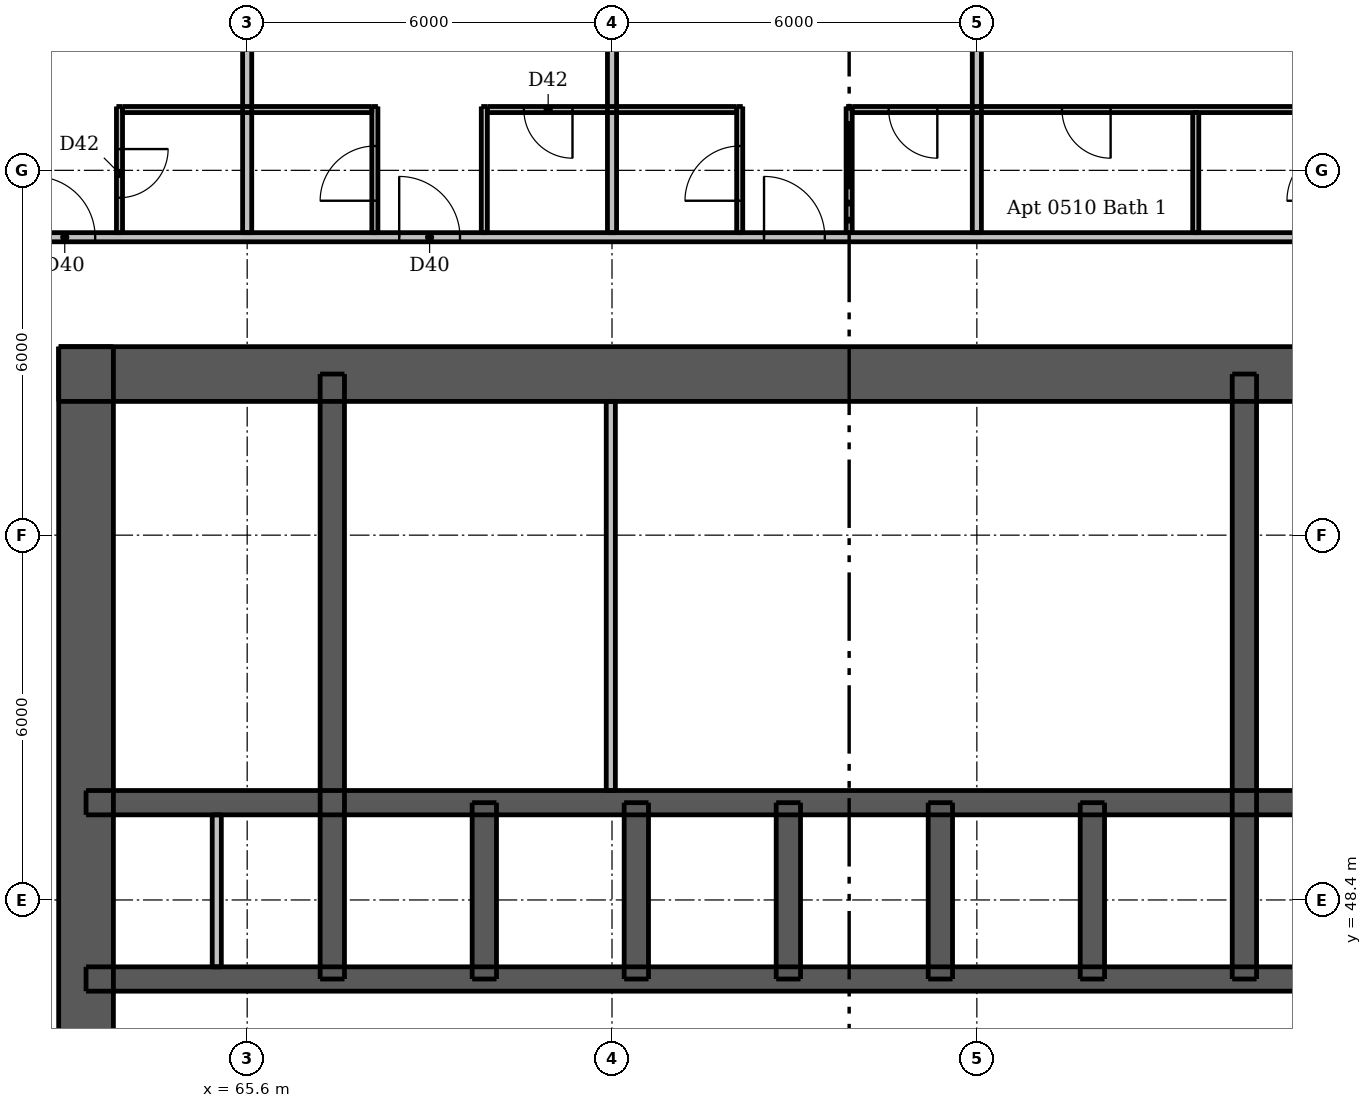
"""IFC4 building model, lengths in metres.
Left out: names, types, materials, properties, quantities, classifications, styles, units other than length and angle.
Written with IfcOpenShell. Run it as: python <this file> out.ifc"""

import sys

from ifc_helpers import new_model, si_unit, direction, frame, frame_2d, origin, place, context, subcontext, project, spatial, rectangle, extrude, element, fill, save


model = new_model("IFC4")
c1 = context("Model", 3, precision=1e-05, world=origin(), true_north=direction((0.0, 1.0)))
c2 = subcontext(c1, "Body", "Model", "MODEL_VIEW")
j1 = project(units=[si_unit("LENGTHUNIT", "METRE"), si_unit("PLANEANGLEUNIT", "RADIAN")], contexts=[c1])
p1 = place(None, origin())
s1 = spatial("IfcSite", under=j1, at=p1, CompositionType="ELEMENT")
p2 = place(p1, origin())
s2 = spatial("IfcBuilding", under=s1, at=p2, CompositionType="ELEMENT")
p3 = place(p2, frame((0.0, 0.0, 23.5)))
s3 = spatial("IfcBuildingStorey", under=s2, at=p3, CompositionType="ELEMENT", Elevation=23.5)
p4 = place(p3, frame((62.5, 57.05, 0.0), z_axis=(0.0, 0.0, 1.0), x_axis=(1.0, 0.0, 0.0)))
e1 = element("IfcWall", 1, at=p4, inside=s3, PredefinedType="SHEAR", context=c2, shape_type="SweptSolid", body=[
    extrude(rectangle(XDim=24.0, YDim=0.9, at=frame_2d((12.0, 0.0))), origin(), (0.0, 0.0, 1.0), 3.05),
])
p5 = place(p4, frame((20.85, 0.0, 0.0)))
e2 = element("IfcOpeningElement", 2, at=p5, cuts=e1, PredefinedType="OPENING", context=c2, shape_type="SweptSolid", body=[
    extrude(rectangle(XDim=1.1, YDim=2.1, at=frame_2d((0.55, 1.05))), frame((0.0, 0.46, 0.0), z_axis=(0.0, -1.0, 0.0), x_axis=(1.0, 0.0, 0.0)), (0.0, 0.0, 1.0), 0.92),
])
p6 = place(p4, frame((2.05, 0.0, 0.0)))
e3 = element("IfcOpeningElement", 3, at=p6, cuts=e1, PredefinedType="OPENING", context=c2, shape_type="SweptSolid", body=[
    extrude(rectangle(XDim=1.1, YDim=2.1, at=frame_2d((0.55, 1.05))), frame((0.0, 0.46, 0.0), z_axis=(0.0, -1.0, 0.0), x_axis=(1.0, 0.0, 0.0)), (0.0, 0.0, 1.0), 0.92),
])
p7 = place(p4, frame((6.44, 0.0, 0.0)))
e4 = element("IfcOpeningElement", 4, at=p7, cuts=e1, PredefinedType="OPENING", context=c2, shape_type="SweptSolid", body=[
    extrude(rectangle(XDim=0.9, YDim=2.1, at=frame_2d((0.45, 1.05))), frame((0.0, 0.46, 0.0), z_axis=(0.0, -1.0, 0.0), x_axis=(1.0, 0.0, 0.0)), (0.0, 0.0, 1.0), 0.92),
])
p8 = place(p4, frame((13.74, 0.0, 0.0)))
e5 = element("IfcOpeningElement", 5, at=p8, cuts=e1, PredefinedType="OPENING", context=c2, shape_type="SweptSolid", body=[
    extrude(rectangle(XDim=0.9, YDim=2.1, at=frame_2d((0.45, 1.05))), frame((0.0, 0.46, 0.0), z_axis=(0.0, -1.0, 0.0), x_axis=(1.0, 0.0, 0.0)), (0.0, 0.0, 1.0), 0.92),
])
p9 = place(p3, frame((62.95, 33.5, 0.0), z_axis=(0.0, 0.0, 1.0), x_axis=(0.0, 1.0, 0.0)))
e6 = element("IfcWall", 6, at=p9, inside=s3, PredefinedType="SHEAR", context=c2, shape_type="SweptSolid", body=[
    extrude(rectangle(XDim=24.0, YDim=0.9, at=frame_2d((12.0, 0.0))), origin(), (0.0, 0.0, 1.0), 3.05),
])
p10 = place(p9, frame((11.2, 0.0, 0.0)))
e7 = element("IfcOpeningElement", 7, at=p10, cuts=e6, PredefinedType="OPENING", context=c2, shape_type="SweptSolid", body=[
    extrude(rectangle(XDim=1.6, YDim=2.1, at=frame_2d((0.8, 1.05))), frame((0.0, 0.46, 0.0), z_axis=(0.0, -1.0, 0.0), x_axis=(1.0, 0.0, 0.0)), (0.0, 0.0, 1.0), 0.92),
])
p11 = place(p3, frame((62.95, 47.1, 0.0), z_axis=(0.0, 0.0, 1.0), x_axis=(1.0, 0.0, 0.0)))
e8 = element("IfcWall", 8, at=p11, inside=s3, PredefinedType="SHEAR", context=c2, shape_type="SweptSolid", body=[
    extrude(rectangle(XDim=23.1, YDim=0.4, at=frame_2d((11.55, 0.0))), origin(), (0.0, 0.0, 1.0), 3.05),
])
p12 = place(p11, frame((0.85, 0.0, 0.0)))
e9 = element("IfcOpeningElement", 9, at=p12, cuts=e8, PredefinedType="OPENING", context=c2, shape_type="SweptSolid", body=[
    extrude(rectangle(XDim=0.9, YDim=2.1, at=frame_2d((0.45, 1.05))), frame((0.0, 0.21, 0.0), z_axis=(0.0, -1.0, 0.0), x_axis=(1.0, 0.0, 0.0)), (0.0, 0.0, 1.0), 0.42),
])
p13 = place(p11, frame((2.55, 0.0, 0.0)))
e10 = element("IfcOpeningElement", 10, at=p13, cuts=e8, PredefinedType="OPENING", context=c2, shape_type="SweptSolid", body=[
    extrude(rectangle(XDim=0.9, YDim=2.1, at=frame_2d((0.45, 1.05))), frame((0.0, 0.21, 0.0), z_axis=(0.0, -1.0, 0.0), x_axis=(1.0, 0.0, 0.0)), (0.0, 0.0, 1.0), 0.42),
])
p14 = place(p11, frame((20.5, 0.0, 0.0)))
e11 = element("IfcOpeningElement", 11, at=p14, cuts=e8, PredefinedType="OPENING", context=c2, shape_type="SweptSolid", body=[
    extrude(rectangle(XDim=0.9, YDim=2.1, at=frame_2d((0.45, 1.05))), frame((0.0, 0.21, 0.0), z_axis=(0.0, -1.0, 0.0), x_axis=(1.0, 0.0, 0.0)), (0.0, 0.0, 1.0), 0.42),
])
p15 = place(p3, frame((62.95, 50.0, 0.0), z_axis=(0.0, 0.0, 1.0), x_axis=(1.0, 0.0, 0.0)))
e12 = element("IfcWall", 12, at=p15, inside=s3, PredefinedType="SHEAR", context=c2, shape_type="SweptSolid", body=[
    extrude(rectangle(XDim=23.1, YDim=0.4, at=frame_2d((11.55, 0.0))), origin(), (0.0, 0.0, 1.0), 3.05),
])
for number, where, z_axis, x_axis in (
    (13, (67.0, 47.1, 0.0), (0.0, 0.0, 1.0), (0.0, 1.0, 0.0)),
    (14, (82.0, 47.1, 0.0), (0.0, 0.0, 1.0), (0.0, 1.0, 0.0)),
):
    element("IfcWall", number, at=place(p3, frame(where, z_axis=z_axis, x_axis=x_axis)), inside=s3, PredefinedType="SHEAR", context=c2, shape_type="SweptSolid", body=[
        extrude(rectangle(XDim=9.95, YDim=0.4, at=frame_2d((4.975, 0.0))), origin(), (0.0, 0.0, 1.0), 3.05),
    ])
for number, where, z_axis, x_axis in (
    (15, (69.5, 47.1, 0.0), (0.0, 0.0, 1.0), (0.0, 1.0, 0.0)),
    (16, (72.0, 47.1, 0.0), (0.0, 0.0, 1.0), (0.0, 1.0, 0.0)),
    (17, (74.5, 47.1, 0.0), (0.0, 0.0, 1.0), (0.0, 1.0, 0.0)),
    (18, (77.0, 47.1, 0.0), (0.0, 0.0, 1.0), (0.0, 1.0, 0.0)),
    (19, (79.5, 47.1, 0.0), (0.0, 0.0, 1.0), (0.0, 1.0, 0.0)),
):
    element("IfcWall", number, at=place(p3, frame(where, z_axis=z_axis, x_axis=x_axis)), inside=s3, PredefinedType="SHEAR", context=c2, shape_type="SweptSolid", body=[
        extrude(rectangle(XDim=2.9, YDim=0.4, at=frame_2d((1.45, 0.0))), origin(), (0.0, 0.0, 1.0), 3.05),
    ])
p16 = place(p3, frame((65.1, 47.3, 0.0), z_axis=(0.0, 0.0, 1.0), x_axis=(0.0, 1.0, 0.0)))
e20 = element("IfcWall", 20, at=p16, inside=s3, PredefinedType="PLUMBINGWALL", context=c2, shape_type="SweptSolid", body=[
    extrude(rectangle(XDim=2.5, YDim=0.15, at=frame_2d((1.25, 0.0))), origin(), (0.0, 0.0, 1.0), 3.05),
])
p17 = place(p3, frame((71.58, 50.2, 0.0), z_axis=(0.0, 0.0, 1.0), x_axis=(0.0, 1.0, 0.0)))
e21 = element("IfcWall", 21, at=p17, inside=s3, PredefinedType="PLUMBINGWALL", context=c2, shape_type="SweptSolid", body=[
    extrude(rectangle(XDim=6.4, YDim=0.15, at=frame_2d((3.2, 0.0))), origin(), (0.0, 0.0, 1.0), 3.05),
])
p18 = place(p3, frame((63.5, 61.45, 0.0), z_axis=(0.0, 0.0, 1.0), x_axis=(0.0, -1.0, 0.0)))
e22 = element("IfcWall", 22, at=p18, inside=s3, PredefinedType="PARTITIONING", context=c2, shape_type="SweptSolid", body=[
    extrude(rectangle(XDim=2.075, YDim=0.1, at=frame_2d((1.038, 0.0))), origin(), (0.0, 0.0, 1.0), 3.05),
])
p19 = place(p18, frame((0.7, 0.0, 0.0)))
e23 = element("IfcOpeningElement", 23, at=p19, cuts=e22, PredefinedType="OPENING", context=c2, shape_type="SweptSolid", body=[
    extrude(rectangle(XDim=0.8, YDim=2.1, at=frame_2d((0.4, 1.05))), frame((0.0, 0.06, 0.0), z_axis=(0.0, -1.0, 0.0), x_axis=(1.0, 0.0, 0.0)), (0.0, 0.0, 1.0), 0.12),
])
p20 = place(p3, frame((67.7, 59.375, 0.0), z_axis=(0.0, 0.0, 1.0), x_axis=(0.0, 1.0, 0.0)))
e24 = element("IfcWall", 24, at=p20, inside=s3, PredefinedType="PARTITIONING", context=c2, shape_type="SweptSolid", body=[
    extrude(rectangle(XDim=2.075, YDim=0.1, at=frame_2d((1.038, 0.0))), origin(), (0.0, 0.0, 1.0), 3.05),
])
p21 = place(p20, frame((0.525, 0.0, 0.0)))
e25 = element("IfcOpeningElement", 25, at=p21, cuts=e24, PredefinedType="OPENING", context=c2, shape_type="SweptSolid", body=[
    extrude(rectangle(XDim=0.9, YDim=2.1, at=frame_2d((0.45, 1.05))), frame((0.0, 0.06, 0.0), z_axis=(0.0, -1.0, 0.0), x_axis=(1.0, 0.0, 0.0)), (0.0, 0.0, 1.0), 0.12),
])
p22 = place(p3, frame((69.5, 59.375, 0.0), z_axis=(0.0, 0.0, 1.0), x_axis=(0.0, 1.0, 0.0)))
e26 = element("IfcWall", 26, at=p22, inside=s3, PredefinedType="PARTITIONING", context=c2, shape_type="SweptSolid", body=[
    extrude(rectangle(XDim=2.075, YDim=0.1, at=frame_2d((1.038, 0.0))), origin(), (0.0, 0.0, 1.0), 3.05),
])
p23 = place(p3, frame((73.7, 59.375, 0.0), z_axis=(0.0, 0.0, 1.0), x_axis=(0.0, 1.0, 0.0)))
e27 = element("IfcWall", 27, at=p23, inside=s3, PredefinedType="PARTITIONING", context=c2, shape_type="SweptSolid", body=[
    extrude(rectangle(XDim=2.075, YDim=0.1, at=frame_2d((1.038, 0.0))), origin(), (0.0, 0.0, 1.0), 3.05),
])
p24 = place(p23, frame((0.525, 0.0, 0.0)))
e28 = element("IfcOpeningElement", 28, at=p24, cuts=e27, PredefinedType="OPENING", context=c2, shape_type="SweptSolid", body=[
    extrude(rectangle(XDim=0.9, YDim=2.1, at=frame_2d((0.45, 1.05))), frame((0.0, 0.06, 0.0), z_axis=(0.0, -1.0, 0.0), x_axis=(1.0, 0.0, 0.0)), (0.0, 0.0, 1.0), 0.12),
])
p25 = place(p3, frame((75.5, 59.375, 0.0), z_axis=(0.0, 0.0, 1.0), x_axis=(0.0, 1.0, 0.0)))
e29 = element("IfcWall", 29, at=p25, inside=s3, PredefinedType="PARTITIONING", context=c2, shape_type="SweptSolid", body=[
    extrude(rectangle(XDim=2.075, YDim=0.1, at=frame_2d((1.038, 0.0))), origin(), (0.0, 0.0, 1.0), 3.05),
])
p26 = place(p3, frame((81.2, 59.375, 0.0), z_axis=(0.0, 0.0, 1.0), x_axis=(0.0, 1.0, 0.0)))
e30 = element("IfcWall", 30, at=p26, inside=s3, PredefinedType="PARTITIONING", context=c2, shape_type="SweptSolid", body=[
    extrude(rectangle(XDim=1.975, YDim=0.1, at=frame_2d((0.988, 0.0))), origin(), (0.0, 0.0, 1.0), 3.05),
])
p27 = place(p3, frame((63.55, 61.4, 0.0), z_axis=(0.0, 0.0, 1.0), x_axis=(1.0, 0.0, 0.0)))
e31 = element("IfcWall", 31, at=p27, inside=s3, PredefinedType="PARTITIONING", context=c2, shape_type="SweptSolid", body=[
    extrude(rectangle(XDim=4.1, YDim=0.1, at=frame_2d((2.05, 0.0))), origin(), (0.0, 0.0, 1.0), 3.05),
])
p28 = place(p3, frame((73.65, 61.4, 0.0), z_axis=(0.0, 0.0, 1.0), x_axis=(-1.0, 0.0, 0.0)))
e32 = element("IfcWall", 32, at=p28, inside=s3, PredefinedType="PARTITIONING", context=c2, shape_type="SweptSolid", body=[
    extrude(rectangle(XDim=4.1, YDim=0.1, at=frame_2d((2.05, 0.0))), origin(), (0.0, 0.0, 1.0), 3.05),
])
p29 = place(p28, frame((2.7, 0.0, 0.0)))
e33 = element("IfcOpeningElement", 33, at=p29, cuts=e32, PredefinedType="OPENING", context=c2, shape_type="SweptSolid", body=[
    extrude(rectangle(XDim=0.8, YDim=2.1, at=frame_2d((0.4, 1.05))), frame((0.0, 0.06, 0.0), z_axis=(0.0, -1.0, 0.0), x_axis=(1.0, 0.0, 0.0)), (0.0, 0.0, 1.0), 0.12),
])
p30 = place(p3, frame((83.55, 61.4, 0.0), z_axis=(0.0, 0.0, 1.0), x_axis=(-1.0, 0.0, 0.0)))
e34 = element("IfcWall", 34, at=p30, inside=s3, PredefinedType="PARTITIONING", context=c2, shape_type="SweptSolid", body=[
    extrude(rectangle(XDim=8.0, YDim=0.1, at=frame_2d((4.0, 0.0))), origin(), (0.0, 0.0, 1.0), 3.05),
])
p31 = place(p30, frame((6.6, 0.0, 0.0)))
e35 = element("IfcOpeningElement", 35, at=p31, cuts=e34, PredefinedType="OPENING", context=c2, shape_type="SweptSolid", body=[
    extrude(rectangle(XDim=0.8, YDim=2.1, at=frame_2d((0.4, 1.05))), frame((0.0, 0.06, 0.0), z_axis=(0.0, -1.0, 0.0), x_axis=(1.0, 0.0, 0.0)), (0.0, 0.0, 1.0), 0.12),
])
p32 = place(p30, frame((3.75, 0.0, 0.0)))
e36 = element("IfcOpeningElement", 36, at=p32, cuts=e34, PredefinedType="OPENING", context=c2, shape_type="SweptSolid", body=[
    extrude(rectangle(XDim=0.8, YDim=2.1, at=frame_2d((0.4, 1.05))), frame((0.0, 0.06, 0.0), z_axis=(0.0, -1.0, 0.0), x_axis=(1.0, 0.0, 0.0)), (0.0, 0.0, 1.0), 0.12),
])
for number, where, z_axis, x_axis in (
    (37, (65.6, 59.375, 0.0), (0.0, 0.0, 1.0), (0.0, 1.0, 0.0)),
    (38, (71.6, 59.375, 0.0), (0.0, 0.0, 1.0), (0.0, 1.0, 0.0)),
    (39, (77.6, 59.375, 0.0), (0.0, 0.0, 1.0), (0.0, 1.0, 0.0)),
):
    element("IfcWall", number, at=place(p3, frame(where, z_axis=z_axis, x_axis=x_axis)), inside=s3, PredefinedType="PARTITIONING", context=c2, shape_type="SweptSolid", body=[
        extrude(rectangle(XDim=8.625, YDim=0.15, at=frame_2d((4.312, 0.0))), origin(), (0.0, 0.0, 1.0), 2.516),
    ])
p33 = place(p3, frame((59.675, 59.3, 0.0), z_axis=(0.0, 0.0, 1.0), x_axis=(1.0, 0.0, 0.0)))
e40 = element("IfcWall", 40, at=p33, inside=s3, PredefinedType="PARTITIONING", context=c2, shape_type="SweptSolid", body=[
    extrude(rectangle(XDim=28.55, YDim=0.15, at=frame_2d((14.275, 0.0))), origin(), (0.0, 0.0, 1.0), 3.05),
])
p34 = place(p33, frame((2.425, 0.0, 0.0)))
e41 = element("IfcOpeningElement", 41, at=p34, cuts=e40, PredefinedType="OPENING", context=c2, shape_type="SweptSolid", body=[
    extrude(rectangle(XDim=1.0, YDim=2.1, at=frame_2d((0.5, 1.05))), frame((0.0, 0.085, 0.0), z_axis=(0.0, -1.0, 0.0), x_axis=(1.0, 0.0, 0.0)), (0.0, 0.0, 1.0), 0.17),
])
p35 = place(p33, frame((8.425, 0.0, 0.0)))
e42 = element("IfcOpeningElement", 42, at=p35, cuts=e40, PredefinedType="OPENING", context=c2, shape_type="SweptSolid", body=[
    extrude(rectangle(XDim=1.0, YDim=2.1, at=frame_2d((0.5, 1.05))), frame((0.0, 0.085, 0.0), z_axis=(0.0, -1.0, 0.0), x_axis=(1.0, 0.0, 0.0)), (0.0, 0.0, 1.0), 0.17),
])
p36 = place(p33, frame((14.425, 0.0, 0.0)))
e43 = element("IfcOpeningElement", 43, at=p36, cuts=e40, PredefinedType="OPENING", context=c2, shape_type="SweptSolid", body=[
    extrude(rectangle(XDim=1.0, YDim=2.1, at=frame_2d((0.5, 1.05))), frame((0.0, 0.085, 0.0), z_axis=(0.0, -1.0, 0.0), x_axis=(1.0, 0.0, 0.0)), (0.0, 0.0, 1.0), 0.17),
])
p37 = place(p33, frame((25.775, 0.0, 0.0)))
e44 = element("IfcOpeningElement", 44, at=p37, cuts=e40, PredefinedType="OPENING", context=c2, shape_type="SweptSolid", body=[
    extrude(rectangle(XDim=1.0, YDim=2.1, at=frame_2d((0.5, 1.05))), frame((0.0, 0.085, 0.0), z_axis=(0.0, -1.0, 0.0), x_axis=(1.0, 0.0, 0.0)), (0.0, 0.0, 1.0), 0.17),
])
p38 = place(p6, origin())
e45 = element("IfcDoor", 45, at=p38, inside=s3, OperationType="SINGLE_SWING_LEFT", PredefinedType="DOOR", context=c2, shape_type="SweptSolid", body=[
    extrude(rectangle(XDim=1.1, YDim=2.1, at=frame_2d((0.55, 1.05))), frame((0.0, -0.388, 0.0), z_axis=(0.0, -1.0, 0.0), x_axis=(1.0, 0.0, 0.0)), (0.0, 0.0, 1.0), 0.05),
])
fill(e3, e45)
p39 = place(p12, origin())
e46 = element("IfcDoor", 46, at=p39, inside=s3, OperationType="SINGLE_SWING_LEFT", PredefinedType="DOOR", context=c2, shape_type="SweptSolid", body=[
    extrude(rectangle(XDim=0.9, YDim=2.1, at=frame_2d((0.45, 1.05))), frame((0.0, 0.188, 0.0), z_axis=(0.0, -1.0, 0.0), x_axis=(1.0, 0.0, 0.0)), (0.0, 0.0, 1.0), 0.05),
])
fill(e9, e46)
p40 = place(p13, origin())
e47 = element("IfcDoor", 47, at=p40, inside=s3, OperationType="SINGLE_SWING_RIGHT", PredefinedType="DOOR", context=c2, shape_type="SweptSolid", body=[
    extrude(rectangle(XDim=0.9, YDim=2.1, at=frame_2d((0.45, 1.05))), frame((0.0, 0.188, 0.0), z_axis=(0.0, -1.0, 0.0), x_axis=(1.0, 0.0, 0.0)), (0.0, 0.0, 1.0), 0.05),
])
fill(e10, e47)
p41 = place(p7, origin())
e48 = element("IfcDoor", 48, at=p41, inside=s3, OperationType="SINGLE_SWING_RIGHT", PredefinedType="DOOR", context=c2, shape_type="SweptSolid", body=[
    extrude(rectangle(XDim=0.9, YDim=2.1, at=frame_2d((0.45, 1.05))), frame((0.0, -0.388, 0.0), z_axis=(0.0, -1.0, 0.0), x_axis=(1.0, 0.0, 0.0)), (0.0, 0.0, 1.0), 0.05),
])
fill(e4, e48)
p42 = place(p8, origin())
e49 = element("IfcDoor", 49, at=p42, inside=s3, OperationType="SINGLE_SWING_RIGHT", PredefinedType="DOOR", context=c2, shape_type="SweptSolid", body=[
    extrude(rectangle(XDim=0.9, YDim=2.1, at=frame_2d((0.45, 1.05))), frame((0.0, -0.388, 0.0), z_axis=(0.0, -1.0, 0.0), x_axis=(1.0, 0.0, 0.0)), (0.0, 0.0, 1.0), 0.05),
])
fill(e5, e49)
p43 = place(p34, origin())
e50 = element("IfcDoor", 50, at=p43, inside=s3, OperationType="SINGLE_SWING_LEFT", PredefinedType="DOOR", context=c2, shape_type="SweptSolid", body=[
    extrude(rectangle(XDim=1.0, YDim=2.1, at=frame_2d((0.5, 1.05))), frame((0.0, 0.025, 0.0), z_axis=(0.0, -1.0, 0.0), x_axis=(1.0, 0.0, 0.0)), (0.0, 0.0, 1.0), 0.05),
])
fill(e41, e50)
p44 = place(p19, origin())
e51 = element("IfcDoor", 51, at=p44, inside=s3, OperationType="SINGLE_SWING_LEFT", PredefinedType="DOOR", context=c2, shape_type="SweptSolid", body=[
    extrude(rectangle(XDim=0.8, YDim=2.1, at=frame_2d((0.4, 1.05))), frame((0.0, 0.025, 0.0), z_axis=(0.0, -1.0, 0.0), x_axis=(1.0, 0.0, 0.0)), (0.0, 0.0, 1.0), 0.05),
])
fill(e23, e51)
p45 = place(p35, origin())
e52 = element("IfcDoor", 52, at=p45, inside=s3, OperationType="SINGLE_SWING_LEFT", PredefinedType="DOOR", context=c2, shape_type="SweptSolid", body=[
    extrude(rectangle(XDim=1.0, YDim=2.1, at=frame_2d((0.5, 1.05))), frame((0.0, 0.025, 0.0), z_axis=(0.0, -1.0, 0.0), x_axis=(1.0, 0.0, 0.0)), (0.0, 0.0, 1.0), 0.05),
])
fill(e42, e52)
p46 = place(p21, origin())
e53 = element("IfcDoor", 53, at=p46, inside=s3, OperationType="SINGLE_SWING_LEFT", PredefinedType="DOOR", context=c2, shape_type="SweptSolid", body=[
    extrude(rectangle(XDim=0.9, YDim=2.1, at=frame_2d((0.45, 1.05))), frame((0.0, 0.025, 0.0), z_axis=(0.0, -1.0, 0.0), x_axis=(1.0, 0.0, 0.0)), (0.0, 0.0, 1.0), 0.05),
])
fill(e25, e53)
p47 = place(p29, origin())
e54 = element("IfcDoor", 54, at=p47, inside=s3, OperationType="SINGLE_SWING_LEFT", PredefinedType="DOOR", context=c2, shape_type="SweptSolid", body=[
    extrude(rectangle(XDim=0.8, YDim=2.1, at=frame_2d((0.4, 1.05))), frame((0.0, 0.025, 0.0), z_axis=(0.0, -1.0, 0.0), x_axis=(1.0, 0.0, 0.0)), (0.0, 0.0, 1.0), 0.05),
])
fill(e33, e54)
p48 = place(p36, origin())
e55 = element("IfcDoor", 55, at=p48, inside=s3, OperationType="SINGLE_SWING_LEFT", PredefinedType="DOOR", context=c2, shape_type="SweptSolid", body=[
    extrude(rectangle(XDim=1.0, YDim=2.1, at=frame_2d((0.5, 1.05))), frame((0.0, 0.025, 0.0), z_axis=(0.0, -1.0, 0.0), x_axis=(1.0, 0.0, 0.0)), (0.0, 0.0, 1.0), 0.05),
])
fill(e43, e55)
p49 = place(p24, origin())
e56 = element("IfcDoor", 56, at=p49, inside=s3, OperationType="SINGLE_SWING_LEFT", PredefinedType="DOOR", context=c2, shape_type="SweptSolid", body=[
    extrude(rectangle(XDim=0.9, YDim=2.1, at=frame_2d((0.45, 1.05))), frame((0.0, 0.025, 0.0), z_axis=(0.0, -1.0, 0.0), x_axis=(1.0, 0.0, 0.0)), (0.0, 0.0, 1.0), 0.05),
])
fill(e28, e56)
p50 = place(p31, origin())
e57 = element("IfcDoor", 57, at=p50, inside=s3, OperationType="SINGLE_SWING_LEFT", PredefinedType="DOOR", context=c2, shape_type="SweptSolid", body=[
    extrude(rectangle(XDim=0.8, YDim=2.1, at=frame_2d((0.4, 1.05))), frame((0.0, 0.025, 0.0), z_axis=(0.0, -1.0, 0.0), x_axis=(1.0, 0.0, 0.0)), (0.0, 0.0, 1.0), 0.05),
])
fill(e35, e57)
p51 = place(p32, origin())
e58 = element("IfcDoor", 58, at=p51, inside=s3, OperationType="SINGLE_SWING_LEFT", PredefinedType="DOOR", context=c2, shape_type="SweptSolid", body=[
    extrude(rectangle(XDim=0.8, YDim=2.1, at=frame_2d((0.4, 1.05))), frame((0.0, 0.025, 0.0), z_axis=(0.0, -1.0, 0.0), x_axis=(1.0, 0.0, 0.0)), (0.0, 0.0, 1.0), 0.05),
])
fill(e36, e58)
save(model, sys.argv[1])
